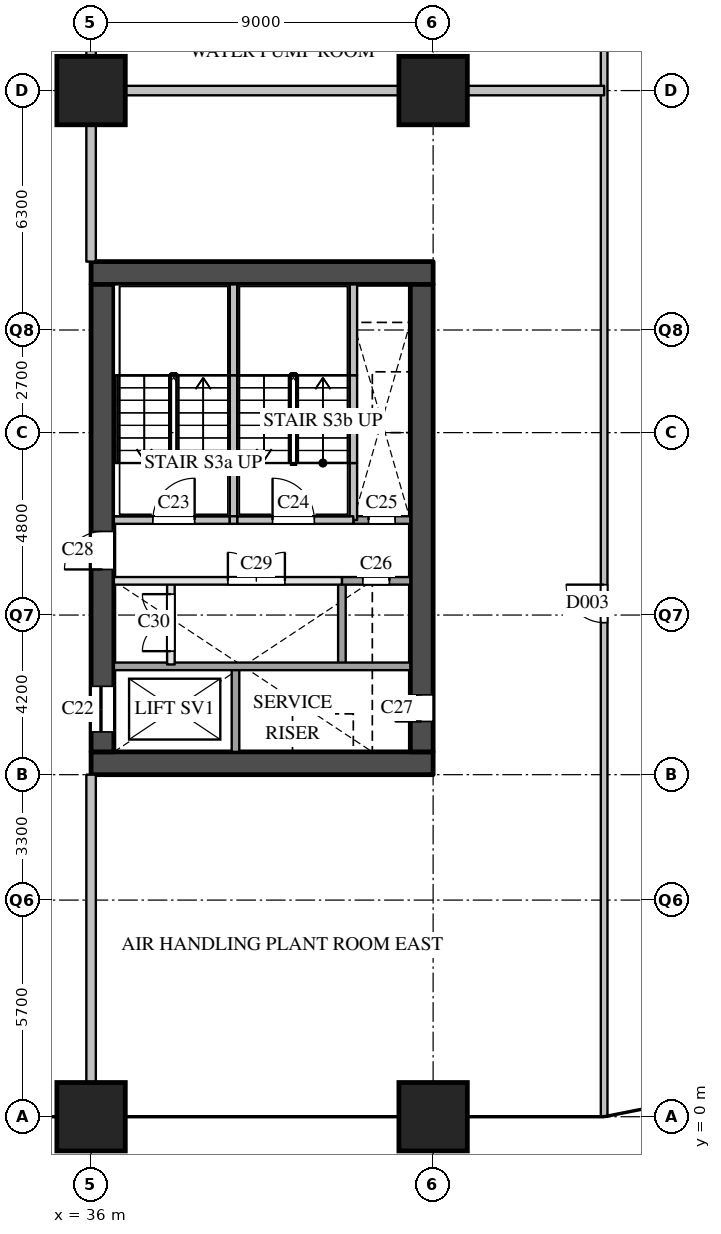
"""IFC4 building model, lengths in metres.
Left out: names, types, materials, properties, quantities, classifications, styles, units other than length and angle.
Written with IfcOpenShell. Run it as: python <this file> out.ifc"""

import sys

from ifc_helpers import new_model, si_unit, direction, frame, frame_2d, origin, origin_2d, place, context, subcontext, project, spatial, rectangle, extrude, element, fill, save


model = new_model("IFC4")
c1 = context("Model", 3, precision=1e-05, world=origin(), true_north=direction((0.0, 1.0)))
c2 = subcontext(c1, "Body", "Model", "MODEL_VIEW")
j1 = project(units=[si_unit("LENGTHUNIT", "METRE"), si_unit("PLANEANGLEUNIT", "RADIAN")], contexts=[c1])
p1 = place(None, origin())
s1 = spatial("IfcSite", under=j1, at=p1, CompositionType="ELEMENT")
p2 = place(p1, origin())
s2 = spatial("IfcBuilding", under=s1, at=p2, CompositionType="ELEMENT")
p3 = place(p2, frame((0.0, 0.0, 26.0)))
s3 = spatial("IfcBuildingStorey", under=s2, at=p3, CompositionType="ELEMENT", Elevation=26.0)
for number, where, z_axis, x_axis in (
    (1, (36.0, 0.0, 0.0), (0.0, 0.0, 1.0), (1.0, 0.0, 0.0)),
    (2, (36.0, 27.0, 0.0), (0.0, 0.0, 1.0), (1.0, 0.0, 0.0)),
    (3, (45.0, 0.0, 0.0), (0.0, 0.0, 1.0), (1.0, 0.0, 0.0)),
    (4, (45.0, 27.0, 0.0), (0.0, 0.0, 1.0), (1.0, 0.0, 0.0)),
):
    element("IfcColumn", number, at=place(p3, frame(where, z_axis=z_axis, x_axis=x_axis)), inside=s3, PredefinedType="COLUMN", context=c2, shape_type="SweptSolid", body=[
        extrude(rectangle(XDim=1.8, YDim=1.8, at=origin_2d()), origin(), (0.0, 0.0, 1.0), 5.0),
    ])
for number, where, z_axis, x_axis in (
    (5, (36.0, 9.3, 0.0), (0.0, 0.0, 1.0), (1.0, 0.0, 0.0)),
    (6, (36.0, 22.2, 0.0), (0.0, 0.0, 1.0), (1.0, 0.0, 0.0)),
):
    element("IfcWall", number, at=place(p3, frame(where, z_axis=z_axis, x_axis=x_axis)), inside=s3, PredefinedType="SHEAR", context=c2, shape_type="SweptSolid", body=[
        extrude(rectangle(XDim=9.0, YDim=0.6, at=frame_2d((4.5, 0.0))), origin(), (0.0, 0.0, 1.0), 4.7),
    ])
p4 = place(p3, frame((36.3, 9.6, 0.0), z_axis=(0.0, 0.0, 1.0), x_axis=(0.0, 1.0, 0.0)))
e7 = element("IfcWall", 7, at=p4, inside=s3, PredefinedType="SHEAR", context=c2, shape_type="SweptSolid", body=[
    extrude(rectangle(XDim=12.3, YDim=0.6, at=frame_2d((6.15, 0.0))), origin(), (0.0, 0.0, 1.0), 4.7),
])
p5 = place(p4, frame((0.525, 0.0, 0.0)))
e8 = element("IfcOpeningElement", 8, at=p5, cuts=e7, PredefinedType="OPENING", context=c2, shape_type="SweptSolid", body=[
    extrude(rectangle(XDim=1.2, YDim=2.1, at=frame_2d((0.6, 1.05))), frame((0.0, 0.31, 0.0), z_axis=(0.0, -1.0, 0.0), x_axis=(1.0, 0.0, 0.0)), (0.0, 0.0, 1.0), 0.62),
])
p6 = place(p4, frame((4.8, 0.0, 0.0)))
e9 = element("IfcOpeningElement", 9, at=p6, cuts=e7, PredefinedType="OPENING", context=c2, shape_type="SweptSolid", body=[
    extrude(rectangle(XDim=1.0, YDim=2.1, at=frame_2d((0.5, 1.05))), frame((0.0, 0.31, 0.0), z_axis=(0.0, -1.0, 0.0), x_axis=(1.0, 0.0, 0.0)), (0.0, 0.0, 1.0), 0.62),
])
p7 = place(p3, frame((44.7, 9.6, 0.0), z_axis=(0.0, 0.0, 1.0), x_axis=(0.0, 1.0, 0.0)))
e10 = element("IfcWall", 10, at=p7, inside=s3, PredefinedType="SHEAR", context=c2, shape_type="SweptSolid", body=[
    extrude(rectangle(XDim=12.3, YDim=0.6, at=frame_2d((6.15, 0.0))), origin(), (0.0, 0.0, 1.0), 4.7),
])
p8 = place(p7, frame((0.8, 0.0, 0.0)))
e11 = element("IfcOpeningElement", 11, at=p8, cuts=e10, PredefinedType="OPENING", context=c2, shape_type="SweptSolid", body=[
    extrude(rectangle(XDim=0.7, YDim=2.1, at=frame_2d((0.35, 1.05))), frame((0.0, 0.31, 0.0), z_axis=(0.0, -1.0, 0.0), x_axis=(1.0, 0.0, 0.0)), (0.0, 0.0, 1.0), 0.62),
])
p9 = place(p3, frame((38.1, 11.9, 0.0), z_axis=(0.0, 0.0, 1.0), x_axis=(0.0, 1.0, 0.0)))
e12 = element("IfcWall", 12, at=p9, inside=s3, PredefinedType="PARTITIONING", context=c2, shape_type="SweptSolid", body=[
    extrude(rectangle(XDim=2.2, YDim=0.2, at=frame_2d((1.1, 0.0))), origin(), (0.0, 0.0, 1.0), 4.7),
])
p10 = place(p9, frame((0.35, 0.0, 0.0)))
e13 = element("IfcOpeningElement", 13, at=p10, cuts=e12, PredefinedType="OPENING", context=c2, shape_type="SweptSolid", body=[
    extrude(rectangle(XDim=1.5, YDim=2.1, at=frame_2d((0.75, 1.05))), frame((0.0, 0.11, 0.0), z_axis=(0.0, -1.0, 0.0), x_axis=(1.0, 0.0, 0.0)), (0.0, 0.0, 1.0), 0.22),
])
p11 = place(p3, frame((39.75, 15.7, 0.0), z_axis=(0.0, 0.0, 1.0), x_axis=(0.0, 1.0, 0.0)))
e14 = element("IfcWall", 14, at=p11, inside=s3, PredefinedType="SOLIDWALL", context=c2, shape_type="SweptSolid", body=[
    extrude(rectangle(XDim=1.5, YDim=0.2, at=frame_2d((0.75, 0.0))), origin(), (0.0, 0.0, 1.0), 4.7),
])
p12 = place(p3, frame((39.75, 17.2, 0.0), z_axis=(0.0, 0.0, 1.0), x_axis=(0.0, 1.0, 0.0)))
e15 = element("IfcWall", 15, at=p12, inside=s3, PredefinedType="SOLIDWALL", context=c2, shape_type="SweptSolid", body=[
    extrude(rectangle(XDim=2.31, YDim=0.2, at=frame_2d((1.155, 0.0))), origin(), (0.0, 0.0, 1.0), 4.7),
])
p13 = place(p3, frame((39.75, 19.51, 0.0), z_axis=(0.0, 0.0, 1.0), x_axis=(0.0, 1.0, 0.0)))
e16 = element("IfcWall", 16, at=p13, inside=s3, PredefinedType="SOLIDWALL", context=c2, shape_type="SweptSolid", body=[
    extrude(rectangle(XDim=2.39, YDim=0.2, at=frame_2d((1.195, 0.0))), origin(), (0.0, 0.0, 1.0), 4.7),
])
p14 = place(p3, frame((39.8, 9.6, 0.0), z_axis=(0.0, 0.0, 1.0), x_axis=(0.0, 1.0, 0.0)))
e17 = element("IfcWall", 17, at=p14, inside=s3, PredefinedType="SOLIDWALL", context=c2, shape_type="SweptSolid", body=[
    extrude(rectangle(XDim=2.3, YDim=0.2, at=frame_2d((1.15, 0.0))), origin(), (0.0, 0.0, 1.0), 4.7),
])
p15 = place(p3, frame((42.6, 11.9, 0.0), z_axis=(0.0, 0.0, 1.0), x_axis=(0.0, 1.0, 0.0)))
e18 = element("IfcWall", 18, at=p15, inside=s3, PredefinedType="SOLIDWALL", context=c2, shape_type="SweptSolid", body=[
    extrude(rectangle(XDim=2.2, YDim=0.2, at=frame_2d((1.1, 0.0))), origin(), (0.0, 0.0, 1.0), 4.7),
])
p16 = place(p3, frame((42.9, 15.7, 0.0), z_axis=(0.0, 0.0, 1.0), x_axis=(0.0, 1.0, 0.0)))
e19 = element("IfcWall", 19, at=p16, inside=s3, PredefinedType="SOLIDWALL", context=c2, shape_type="SweptSolid", body=[
    extrude(rectangle(XDim=1.5, YDim=0.2, at=frame_2d((0.75, 0.0))), origin(), (0.0, 0.0, 1.0), 4.7),
])
p17 = place(p3, frame((42.9, 17.2, 0.0), z_axis=(0.0, 0.0, 1.0), x_axis=(0.0, 1.0, 0.0)))
e20 = element("IfcWall", 20, at=p17, inside=s3, PredefinedType="SOLIDWALL", context=c2, shape_type="SweptSolid", body=[
    extrude(rectangle(XDim=2.31, YDim=0.2, at=frame_2d((1.155, 0.0))), origin(), (0.0, 0.0, 1.0), 4.7),
])
p18 = place(p3, frame((42.9, 19.51, 0.0), z_axis=(0.0, 0.0, 1.0), x_axis=(0.0, 1.0, 0.0)))
e21 = element("IfcWall", 21, at=p18, inside=s3, PredefinedType="SOLIDWALL", context=c2, shape_type="SweptSolid", body=[
    extrude(rectangle(XDim=2.39, YDim=0.2, at=frame_2d((1.195, 0.0))), origin(), (0.0, 0.0, 1.0), 4.7),
])
p19 = place(p3, frame((36.6, 11.85, 0.0), z_axis=(0.0, 0.0, 1.0), x_axis=(1.0, 0.0, 0.0)))
e22 = element("IfcWall", 22, at=p19, inside=s3, PredefinedType="SOLIDWALL", context=c2, shape_type="SweptSolid", body=[
    extrude(rectangle(XDim=7.8, YDim=0.2, at=frame_2d((3.9, 0.0))), origin(), (0.0, 0.0, 1.0), 4.7),
])
p20 = place(p3, frame((36.6, 14.1, 0.0), z_axis=(0.0, 0.0, 1.0), x_axis=(1.0, 0.0, 0.0)))
e23 = element("IfcWall", 23, at=p20, inside=s3, PredefinedType="PARTITIONING", context=c2, shape_type="SweptSolid", body=[
    extrude(rectangle(XDim=6.0, YDim=0.2, at=frame_2d((3.0, 0.0))), origin(), (0.0, 0.0, 1.0), 4.7),
])
p21 = place(p20, frame((3.0, 0.0, 0.0)))
e24 = element("IfcOpeningElement", 24, at=p21, cuts=e23, PredefinedType="OPENING", context=c2, shape_type="SweptSolid", body=[
    extrude(rectangle(XDim=1.5, YDim=2.1, at=frame_2d((0.75, 1.05))), frame((0.0, 0.11, 0.0), z_axis=(0.0, -1.0, 0.0), x_axis=(1.0, 0.0, 0.0)), (0.0, 0.0, 1.0), 0.22),
])
p22 = place(p3, frame((42.6, 14.1, 0.0), z_axis=(0.0, 0.0, 1.0), x_axis=(1.0, 0.0, 0.0)))
e25 = element("IfcWall", 25, at=p22, inside=s3, PredefinedType="SOLIDWALL", context=c2, shape_type="SweptSolid", body=[
    extrude(rectangle(XDim=1.8, YDim=0.2, at=frame_2d((0.9, 0.0))), origin(), (0.0, 0.0, 1.0), 4.7),
])
p23 = place(p22, frame((0.55, 0.0, 0.0)))
e26 = element("IfcOpeningElement", 26, at=p23, cuts=e25, PredefinedType="OPENING", context=c2, shape_type="SweptSolid", body=[
    extrude(rectangle(XDim=0.7, YDim=2.1, at=frame_2d((0.35, 1.05))), frame((0.0, 0.11, 0.0), z_axis=(0.0, -1.0, 0.0), x_axis=(1.0, 0.0, 0.0)), (0.0, 0.0, 1.0), 0.22),
])
p24 = place(p3, frame((42.9, 15.7, 0.0), z_axis=(0.0, 0.0, 1.0), x_axis=(1.0, 0.0, 0.0)))
e27 = element("IfcWall", 27, at=p24, inside=s3, PredefinedType="SOLIDWALL", context=c2, shape_type="SweptSolid", body=[
    extrude(rectangle(XDim=1.5, YDim=0.2, at=frame_2d((0.75, 0.0))), origin(), (0.0, 0.0, 1.0), 4.7),
])
p25 = place(p24, frame((0.4, 0.0, 0.0)))
e28 = element("IfcOpeningElement", 28, at=p25, cuts=e27, PredefinedType="OPENING", context=c2, shape_type="SweptSolid", body=[
    extrude(rectangle(XDim=0.7, YDim=2.1, at=frame_2d((0.35, 1.05))), frame((0.0, 0.11, 0.0), z_axis=(0.0, -1.0, 0.0), x_axis=(1.0, 0.0, 0.0)), (0.0, 0.0, 1.0), 0.22),
])
p26 = place(p3, frame((36.6, 15.7, 0.0), z_axis=(0.0, 0.0, 1.0), x_axis=(1.0, 0.0, 0.0)))
e29 = element("IfcWall", 29, at=p26, inside=s3, PredefinedType="SOLIDWALL", context=c2, shape_type="SweptSolid", body=[
    extrude(rectangle(XDim=3.05, YDim=0.2, at=frame_2d((1.525, 0.0))), origin(), (0.0, 0.0, 1.0), 4.7),
])
p27 = place(p26, frame((1.025, 0.0, 0.0)))
e30 = element("IfcOpeningElement", 30, at=p27, cuts=e29, PredefinedType="OPENING", context=c2, shape_type="SweptSolid", body=[
    extrude(rectangle(XDim=1.1, YDim=2.1, at=frame_2d((0.55, 1.05))), frame((0.0, 0.11, 0.0), z_axis=(0.0, -1.0, 0.0), x_axis=(1.0, 0.0, 0.0)), (0.0, 0.0, 1.0), 0.22),
])
p28 = place(p3, frame((39.65, 15.7, 0.0), z_axis=(0.0, 0.0, 1.0), x_axis=(1.0, 0.0, 0.0)))
e31 = element("IfcWall", 31, at=p28, inside=s3, PredefinedType="SOLIDWALL", context=c2, shape_type="SweptSolid", body=[
    extrude(rectangle(XDim=0.2, YDim=0.2, at=frame_2d((0.1, 0.0))), origin(), (0.0, 0.0, 1.0), 4.7),
])
p29 = place(p3, frame((39.85, 15.7, 0.0), z_axis=(0.0, 0.0, 1.0), x_axis=(1.0, 0.0, 0.0)))
e32 = element("IfcWall", 32, at=p29, inside=s3, PredefinedType="SOLIDWALL", context=c2, shape_type="SweptSolid", body=[
    extrude(rectangle(XDim=3.05, YDim=0.2, at=frame_2d((1.525, 0.0))), origin(), (0.0, 0.0, 1.0), 4.7),
])
p30 = place(p29, frame((0.925, 0.0, 0.0)))
e33 = element("IfcOpeningElement", 33, at=p30, cuts=e32, PredefinedType="OPENING", context=c2, shape_type="SweptSolid", body=[
    extrude(rectangle(XDim=1.1, YDim=2.1, at=frame_2d((0.55, 1.05))), frame((0.0, 0.11, 0.0), z_axis=(0.0, -1.0, 0.0), x_axis=(1.0, 0.0, 0.0)), (0.0, 0.0, 1.0), 0.22),
])
p31 = place(p3, frame((49.5, 0.0, 0.0), z_axis=(0.0, 0.0, 1.0), x_axis=(0.0, 1.0, 0.0)))
e34 = element("IfcWall", 34, at=p31, inside=s3, PredefinedType="PARTITIONING", context=c2, shape_type="SweptSolid", body=[
    extrude(rectangle(XDim=51.0, YDim=0.175, at=frame_2d((25.5, 0.0))), origin(), (0.0, 0.0, 1.0), 4.7),
])
p32 = place(p31, frame((13.0, 0.0, 0.0)))
e35 = element("IfcOpeningElement", 35, at=p32, cuts=e34, PredefinedType="OPENING", context=c2, shape_type="SweptSolid", body=[
    extrude(rectangle(XDim=1.0, YDim=2.1, at=frame_2d((0.5, 1.05))), frame((0.0, 0.097, 0.0), z_axis=(0.0, -1.0, 0.0), x_axis=(1.0, 0.0, 0.0)), (0.0, 0.0, 1.0), 0.195),
])
p33 = place(p31, frame((38.5, 0.0, 0.0)))
e36 = element("IfcOpeningElement", 36, at=p33, cuts=e34, PredefinedType="OPENING", context=c2, shape_type="SweptSolid", body=[
    extrude(rectangle(XDim=1.0, YDim=2.1, at=frame_2d((0.5, 1.05))), frame((0.0, 0.097, 0.0), z_axis=(0.0, -1.0, 0.0), x_axis=(1.0, 0.0, 0.0)), (0.0, 0.0, 1.0), 0.195),
])
p34 = place(p3, frame((36.0, 27.0, 0.0), z_axis=(0.0, 0.0, 1.0), x_axis=(1.0, 0.0, 0.0)))
e37 = element("IfcWall", 37, at=p34, inside=s3, PredefinedType="PARTITIONING", context=c2, shape_type="SweptSolid", body=[
    extrude(rectangle(XDim=13.5, YDim=0.25, at=frame_2d((6.75, 0.0))), origin(), (0.0, 0.0, 1.0), 4.7),
])
p35 = place(p3, frame((36.0, 0.0, 0.0), z_axis=(0.0, 0.0, 1.0), x_axis=(0.0, 1.0, 0.0)))
e38 = element("IfcWall", 38, at=p35, inside=s3, PredefinedType="PARTITIONING", context=c2, shape_type="SweptSolid", body=[
    extrude(rectangle(XDim=9.0, YDim=0.25, at=frame_2d((4.5, 0.0))), origin(), (0.0, 0.0, 1.0), 4.7),
])
p36 = place(p3, frame((36.0, 22.5, 0.0), z_axis=(0.0, 0.0, 1.0), x_axis=(0.0, 1.0, 0.0)))
e39 = element("IfcWall", 39, at=p36, inside=s3, PredefinedType="PARTITIONING", context=c2, shape_type="SweptSolid", body=[
    extrude(rectangle(XDim=6.0, YDim=0.25, at=frame_2d((3.0, 0.0))), origin(), (0.0, 0.0, 1.0), 4.7),
])
p37 = place(p5, origin())
e40 = element("IfcDoor", 40, at=p37, inside=s3, OperationType="SLIDING_TO_LEFT", PredefinedType="DOOR", context=c2, shape_type="SweptSolid", body=[
    extrude(rectangle(XDim=1.2, YDim=2.1, at=frame_2d((0.6, 1.05))), frame((0.0, 0.025, 0.0), z_axis=(0.0, -1.0, 0.0), x_axis=(1.0, 0.0, 0.0)), (0.0, 0.0, 1.0), 0.05),
])
fill(e8, e40)
p38 = place(p27, origin())
e41 = element("IfcDoor", 41, at=p38, inside=s3, OperationType="SINGLE_SWING_RIGHT", PredefinedType="DOOR", context=c2, shape_type="SweptSolid", body=[
    extrude(rectangle(XDim=1.1, YDim=2.1, at=frame_2d((0.55, 1.05))), frame((0.0, 0.025, 0.0), z_axis=(0.0, -1.0, 0.0), x_axis=(1.0, 0.0, 0.0)), (0.0, 0.0, 1.0), 0.05),
])
fill(e30, e41)
p39 = place(p30, origin())
e42 = element("IfcDoor", 42, at=p39, inside=s3, OperationType="SINGLE_SWING_LEFT", PredefinedType="DOOR", context=c2, shape_type="SweptSolid", body=[
    extrude(rectangle(XDim=1.1, YDim=2.1, at=frame_2d((0.55, 1.05))), frame((0.0, 0.025, 0.0), z_axis=(0.0, -1.0, 0.0), x_axis=(1.0, 0.0, 0.0)), (0.0, 0.0, 1.0), 0.05),
])
fill(e33, e42)
p40 = place(p25, origin())
e43 = element("IfcDoor", 43, at=p40, inside=s3, OperationType="SINGLE_SWING_LEFT", PredefinedType="DOOR", context=c2, shape_type="SweptSolid", body=[
    extrude(rectangle(XDim=0.7, YDim=2.1, at=frame_2d((0.35, 1.05))), frame((0.0, 0.025, 0.0), z_axis=(0.0, -1.0, 0.0), x_axis=(1.0, 0.0, 0.0)), (0.0, 0.0, 1.0), 0.05),
])
fill(e28, e43)
p41 = place(p23, origin())
e44 = element("IfcDoor", 44, at=p41, inside=s3, OperationType="SINGLE_SWING_RIGHT", PredefinedType="DOOR", context=c2, shape_type="SweptSolid", body=[
    extrude(rectangle(XDim=0.7, YDim=2.1, at=frame_2d((0.35, 1.05))), frame((0.0, 0.025, 0.0), z_axis=(0.0, -1.0, 0.0), x_axis=(1.0, 0.0, 0.0)), (0.0, 0.0, 1.0), 0.05),
])
fill(e26, e44)
p42 = place(p8, origin())
e45 = element("IfcDoor", 45, at=p42, inside=s3, OperationType="SINGLE_SWING_LEFT", PredefinedType="DOOR", context=c2, shape_type="SweptSolid", body=[
    extrude(rectangle(XDim=0.7, YDim=2.1, at=frame_2d((0.35, 1.05))), frame((0.0, 0.025, 0.0), z_axis=(0.0, -1.0, 0.0), x_axis=(1.0, 0.0, 0.0)), (0.0, 0.0, 1.0), 0.05),
])
fill(e11, e45)
p43 = place(p6, origin())
e46 = element("IfcDoor", 46, at=p43, inside=s3, OperationType="SINGLE_SWING_LEFT", PredefinedType="DOOR", context=c2, shape_type="SweptSolid", body=[
    extrude(rectangle(XDim=1.0, YDim=2.1, at=frame_2d((0.5, 1.05))), frame((0.0, 0.025, 0.0), z_axis=(0.0, -1.0, 0.0), x_axis=(1.0, 0.0, 0.0)), (0.0, 0.0, 1.0), 0.05),
])
fill(e9, e46)
p44 = place(p21, origin())
e47 = element("IfcDoor", 47, at=p44, inside=s3, OperationType="DOUBLE_DOOR_SINGLE_SWING", PredefinedType="DOOR", context=c2, shape_type="SweptSolid", body=[
    extrude(rectangle(XDim=1.5, YDim=2.1, at=frame_2d((0.75, 1.05))), frame((0.0, 0.025, 0.0), z_axis=(0.0, -1.0, 0.0), x_axis=(1.0, 0.0, 0.0)), (0.0, 0.0, 1.0), 0.05),
])
fill(e24, e47)
p45 = place(p10, origin())
e48 = element("IfcDoor", 48, at=p45, inside=s3, OperationType="DOUBLE_DOOR_SINGLE_SWING", PredefinedType="DOOR", context=c2, shape_type="SweptSolid", body=[
    extrude(rectangle(XDim=1.5, YDim=2.1, at=frame_2d((0.75, 1.05))), frame((0.0, 0.025, 0.0), z_axis=(0.0, -1.0, 0.0), x_axis=(1.0, 0.0, 0.0)), (0.0, 0.0, 1.0), 0.05),
])
fill(e13, e48)
p46 = place(p32, origin())
e49 = element("IfcDoor", 49, at=p46, inside=s3, OperationType="SINGLE_SWING_RIGHT", PredefinedType="DOOR", context=c2, shape_type="SweptSolid", body=[
    extrude(rectangle(XDim=1.0, YDim=2.1, at=frame_2d((0.5, 1.05))), frame((0.0, 0.025, 0.0), z_axis=(0.0, -1.0, 0.0), x_axis=(1.0, 0.0, 0.0)), (0.0, 0.0, 1.0), 0.05),
])
fill(e35, e49)
save(model, sys.argv[1])
